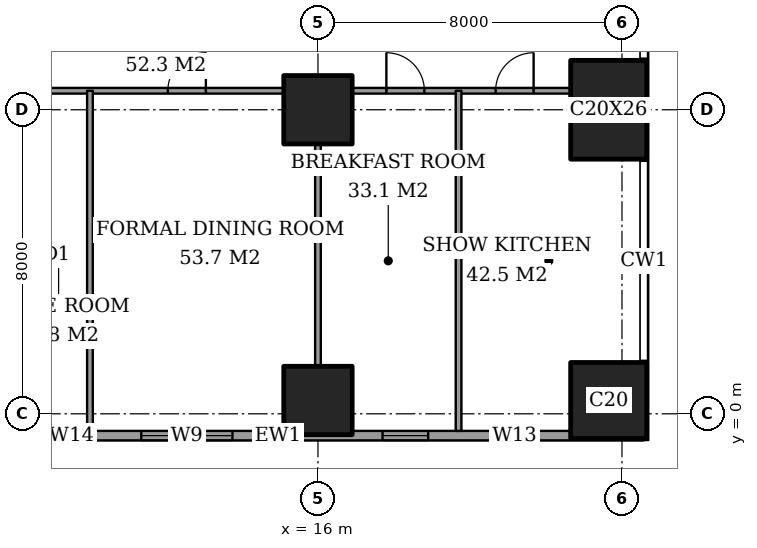
"""IFC4 building model, lengths in metres.
Left out: names, types, materials, properties, quantities, classifications, styles, units other than length and angle.
Written with IfcOpenShell. Run it as: python <this file> out.ifc"""

import sys

from ifc_helpers import new_model, si_unit, direction, frame, frame_2d, origin, origin_2d, place, context, subcontext, project, spatial, rectangle, extrude, element, fill, save


model = new_model("IFC4")
c1 = context("Model", 3, precision=1e-05, world=origin(), true_north=direction((0.0, 1.0)))
c2 = subcontext(c1, "Body", "Model", "MODEL_VIEW")
j1 = project(units=[si_unit("LENGTHUNIT", "METRE"), si_unit("PLANEANGLEUNIT", "RADIAN")], contexts=[c1])
p1 = place(None, origin())
s1 = spatial("IfcSite", under=j1, at=p1, CompositionType="ELEMENT")
p2 = place(p1, origin())
s2 = spatial("IfcBuilding", under=s1, at=p2, CompositionType="ELEMENT")
p3 = place(p2, frame((0.0, 0.0, 203.8)))
s3 = spatial("IfcBuildingStorey", under=s2, at=p3, CompositionType="ELEMENT", Elevation=203.8)
for number, where, z_axis, x_axis in (
    (1, (16.0, 0.35, 0.0), (0.0, 0.0, 1.0), (1.0, 0.0, 0.0)),
    (2, (16.0, 8.0, 0.0), (0.0, 0.0, 1.0), (1.0, 0.0, 0.0)),
):
    element("IfcColumn", number, at=place(p3, frame(where, z_axis=z_axis, x_axis=x_axis)), inside=s3, PredefinedType="COLUMN", context=c2, shape_type="SweptSolid", body=[
        extrude(rectangle(XDim=1.8, YDim=1.8, at=origin_2d()), origin(), (0.0, 0.0, 1.0), 3.6),
    ])
p4 = place(p3, frame((23.65, 0.35, 0.0), z_axis=(0.0, 0.0, 1.0), x_axis=(1.0, 0.0, 0.0)))
e3 = element("IfcColumn", 3, at=p4, inside=s3, PredefinedType="COLUMN", context=c2, shape_type="SweptSolid", body=[
    extrude(rectangle(XDim=2.0, YDim=2.0, at=origin_2d()), origin(), (0.0, 0.0, 1.0), 3.6),
])
p5 = place(p3, frame((23.65, 8.0, 0.0), z_axis=(0.0, 0.0, 1.0), x_axis=(1.0, 0.0, 0.0)))
e4 = element("IfcColumn", 4, at=p5, inside=s3, PredefinedType="COLUMN", context=c2, shape_type="SweptSolid", body=[
    extrude(rectangle(XDim=2.0, YDim=2.6, at=origin_2d()), origin(), (0.0, 0.0, 1.0), 3.6),
])
p6 = place(p3, frame((3.175, -0.575, 0.0), z_axis=(0.0, 0.0, 1.0), x_axis=(1.0, 0.0, 0.0)))
e5 = element("IfcWall", 5, at=p6, inside=s3, PredefinedType="SOLIDWALL", context=c2, shape_type="SweptSolid", body=[
    extrude(rectangle(XDim=21.4, YDim=0.25, at=frame_2d((10.7, 0.0))), origin(), (0.0, 0.0, 1.0), 3.6),
])
p7 = place(p6, frame((0.825, 0.0, 0.2)))
e6 = element("IfcOpeningElement", 6, at=p7, cuts=e5, PredefinedType="OPENING", context=c2, shape_type="SweptSolid", body=[
    extrude(rectangle(XDim=2.4, YDim=2.4, at=frame_2d((1.2, 1.2))), frame((0.0, 0.135, 0.0), z_axis=(0.0, -1.0, 0.0), x_axis=(1.0, 0.0, 0.0)), (0.0, 0.0, 1.0), 0.27),
])
p8 = place(p6, frame((6.05, 0.0, 0.2)))
e7 = element("IfcOpeningElement", 7, at=p8, cuts=e5, PredefinedType="OPENING", context=c2, shape_type="SweptSolid", body=[
    extrude(rectangle(XDim=0.6, YDim=2.4, at=frame_2d((0.3, 1.2))), frame((0.0, 0.135, 0.0), z_axis=(0.0, -1.0, 0.0), x_axis=(1.0, 0.0, 0.0)), (0.0, 0.0, 1.0), 0.27),
])
p9 = place(p6, frame((8.175, 0.0, 0.2)))
e8 = element("IfcOpeningElement", 8, at=p9, cuts=e5, PredefinedType="OPENING", context=c2, shape_type="SweptSolid", body=[
    extrude(rectangle(XDim=2.4, YDim=2.4, at=frame_2d((1.2, 1.2))), frame((0.0, 0.135, 0.0), z_axis=(0.0, -1.0, 0.0), x_axis=(1.0, 0.0, 0.0)), (0.0, 0.0, 1.0), 0.27),
])
p10 = place(p6, frame((14.525, 0.0, 0.2)))
e9 = element("IfcOpeningElement", 9, at=p10, cuts=e5, PredefinedType="OPENING", context=c2, shape_type="SweptSolid", body=[
    extrude(rectangle(XDim=1.2, YDim=2.4, at=frame_2d((0.6, 1.2))), frame((0.0, 0.135, 0.0), z_axis=(0.0, -1.0, 0.0), x_axis=(1.0, 0.0, 0.0)), (0.0, 0.0, 1.0), 0.27),
])
p11 = place(p6, frame((17.4, 0.0, 0.2)))
e10 = element("IfcOpeningElement", 10, at=p11, cuts=e5, PredefinedType="OPENING", context=c2, shape_type="SweptSolid", body=[
    extrude(rectangle(XDim=1.2, YDim=2.4, at=frame_2d((0.6, 1.2))), frame((0.0, 0.135, 0.0), z_axis=(0.0, -1.0, 0.0), x_axis=(1.0, 0.0, 0.0)), (0.0, 0.0, 1.0), 0.27),
])
p12 = place(p3, frame((8.9, 8.5, 0.0), z_axis=(0.0, 0.0, 1.0), x_axis=(1.0, 0.0, 0.0)))
e11 = element("IfcWall", 11, at=p12, inside=s3, PredefinedType="PARTITIONING", context=c2, shape_type="SweptSolid", body=[
    extrude(rectangle(XDim=6.2, YDim=0.15, at=frame_2d((3.1, 0.0))), origin(), (0.0, 0.0, 1.0), 3.35),
])
p13 = place(p12, frame((3.15, 0.0, 0.0)))
e12 = element("IfcOpeningElement", 12, at=p13, cuts=e11, PredefinedType="OPENING", context=c2, shape_type="SweptSolid", body=[
    extrude(rectangle(XDim=1.0, YDim=2.1, at=frame_2d((0.5, 1.05))), frame((0.0, 0.085, 0.0), z_axis=(0.0, -1.0, 0.0), x_axis=(1.0, 0.0, 0.0)), (0.0, 0.0, 1.0), 0.17),
])
p14 = place(p3, frame((16.9, 8.5, 0.0), z_axis=(0.0, 0.0, 1.0), x_axis=(1.0, 0.0, 0.0)))
e13 = element("IfcWall", 13, at=p14, inside=s3, PredefinedType="PARTITIONING", context=c2, shape_type="SweptSolid", body=[
    extrude(rectangle(XDim=5.75, YDim=0.15, at=frame_2d((2.875, 0.0))), origin(), (0.0, 0.0, 1.0), 3.35),
])
p15 = place(p14, frame((0.9, 0.0, 0.0)))
e14 = element("IfcOpeningElement", 14, at=p15, cuts=e13, PredefinedType="OPENING", context=c2, shape_type="SweptSolid", body=[
    extrude(rectangle(XDim=1.0, YDim=2.1, at=frame_2d((0.5, 1.05))), frame((0.0, 0.085, 0.0), z_axis=(0.0, -1.0, 0.0), x_axis=(1.0, 0.0, 0.0)), (0.0, 0.0, 1.0), 0.17),
])
p16 = place(p14, frame((3.775, 0.0, 0.0)))
e15 = element("IfcOpeningElement", 15, at=p16, cuts=e13, PredefinedType="OPENING", context=c2, shape_type="SweptSolid", body=[
    extrude(rectangle(XDim=1.0, YDim=2.1, at=frame_2d((0.5, 1.05))), frame((0.0, 0.085, 0.0), z_axis=(0.0, -1.0, 0.0), x_axis=(1.0, 0.0, 0.0)), (0.0, 0.0, 1.0), 0.17),
])
p17 = place(p3, frame((10.0, -0.45, 0.0), z_axis=(0.0, 0.0, 1.0), x_axis=(0.0, 1.0, 0.0)))
e16 = element("IfcWall", 16, at=p17, inside=s3, PredefinedType="PARTITIONING", context=c2, shape_type="SweptSolid", body=[
    extrude(rectangle(XDim=8.95, YDim=0.15, at=frame_2d((4.475, 0.0))), origin(), (0.0, 0.0, 1.0), 3.35),
])
p18 = place(p3, frame((16.0, 1.25, 0.0), z_axis=(0.0, 0.0, 1.0), x_axis=(0.0, 1.0, 0.0)))
e17 = element("IfcWall", 17, at=p18, inside=s3, PredefinedType="PARTITIONING", context=c2, shape_type="SweptSolid", body=[
    extrude(rectangle(XDim=5.85, YDim=0.15, at=frame_2d((2.925, 0.0))), origin(), (0.0, 0.0, 1.0), 3.35),
])
p19 = place(p3, frame((19.7, -0.45, 0.0), z_axis=(0.0, 0.0, 1.0), x_axis=(0.0, 1.0, 0.0)))
e18 = element("IfcWall", 18, at=p19, inside=s3, PredefinedType="PARTITIONING", context=c2, shape_type="SweptSolid", body=[
    extrude(rectangle(XDim=8.95, YDim=0.15, at=frame_2d((4.475, 0.0))), origin(), (0.0, 0.0, 1.0), 3.35),
])
p20 = place(p8, origin())
e19 = element("IfcWindow", 19, at=p20, inside=s3, PartitioningType="SINGLE_PANEL", PredefinedType="WINDOW", context=c2, shape_type="SweptSolid", body=[
    extrude(rectangle(XDim=0.6, YDim=2.4, at=frame_2d((0.3, 1.2))), frame((0.0, 0.03, 0.0), z_axis=(0.0, -1.0, 0.0), x_axis=(1.0, 0.0, 0.0)), (0.0, 0.0, 1.0), 0.06),
])
fill(e7, e19)
p21 = place(p9, origin())
e20 = element("IfcWindow", 20, at=p21, inside=s3, PartitioningType="SINGLE_PANEL", PredefinedType="WINDOW", context=c2, shape_type="SweptSolid", body=[
    extrude(rectangle(XDim=2.4, YDim=2.4, at=frame_2d((1.2, 1.2))), frame((0.0, 0.03, 0.0), z_axis=(0.0, -1.0, 0.0), x_axis=(1.0, 0.0, 0.0)), (0.0, 0.0, 1.0), 0.06),
])
fill(e8, e20)
p22 = place(p10, origin())
e21 = element("IfcWindow", 21, at=p22, inside=s3, PartitioningType="SINGLE_PANEL", PredefinedType="WINDOW", context=c2, shape_type="SweptSolid", body=[
    extrude(rectangle(XDim=1.2, YDim=2.4, at=frame_2d((0.6, 1.2))), frame((0.0, 0.03, 0.0), z_axis=(0.0, -1.0, 0.0), x_axis=(1.0, 0.0, 0.0)), (0.0, 0.0, 1.0), 0.06),
])
fill(e9, e21)
p23 = place(p11, origin())
e22 = element("IfcWindow", 22, at=p23, inside=s3, PartitioningType="SINGLE_PANEL", PredefinedType="WINDOW", context=c2, shape_type="SweptSolid", body=[
    extrude(rectangle(XDim=1.2, YDim=2.4, at=frame_2d((0.6, 1.2))), frame((0.0, 0.03, 0.0), z_axis=(0.0, -1.0, 0.0), x_axis=(1.0, 0.0, 0.0)), (0.0, 0.0, 1.0), 0.06),
])
fill(e10, e22)
p24 = place(p13, origin())
e23 = element("IfcDoor", 23, at=p24, inside=s3, OperationType="SINGLE_SWING_LEFT", PredefinedType="DOOR", context=c2, shape_type="SweptSolid", body=[
    extrude(rectangle(XDim=1.0, YDim=2.1, at=frame_2d((0.5, 1.05))), frame((0.0, 0.025, 0.0), z_axis=(0.0, -1.0, 0.0), x_axis=(1.0, 0.0, 0.0)), (0.0, 0.0, 1.0), 0.05),
])
fill(e12, e23)
p25 = place(p15, origin())
e24 = element("IfcDoor", 24, at=p25, inside=s3, OperationType="SINGLE_SWING_RIGHT", PredefinedType="DOOR", context=c2, shape_type="SweptSolid", body=[
    extrude(rectangle(XDim=1.0, YDim=2.1, at=frame_2d((0.5, 1.05))), frame((0.0, 0.025, 0.0), z_axis=(0.0, -1.0, 0.0), x_axis=(1.0, 0.0, 0.0)), (0.0, 0.0, 1.0), 0.05),
])
fill(e14, e24)
p26 = place(p16, origin())
e25 = element("IfcDoor", 25, at=p26, inside=s3, OperationType="SINGLE_SWING_LEFT", PredefinedType="DOOR", context=c2, shape_type="SweptSolid", body=[
    extrude(rectangle(XDim=1.0, YDim=2.1, at=frame_2d((0.5, 1.05))), frame((0.0, 0.025, 0.0), z_axis=(0.0, -1.0, 0.0), x_axis=(1.0, 0.0, 0.0)), (0.0, 0.0, 1.0), 0.05),
])
fill(e15, e25)
save(model, sys.argv[1])
